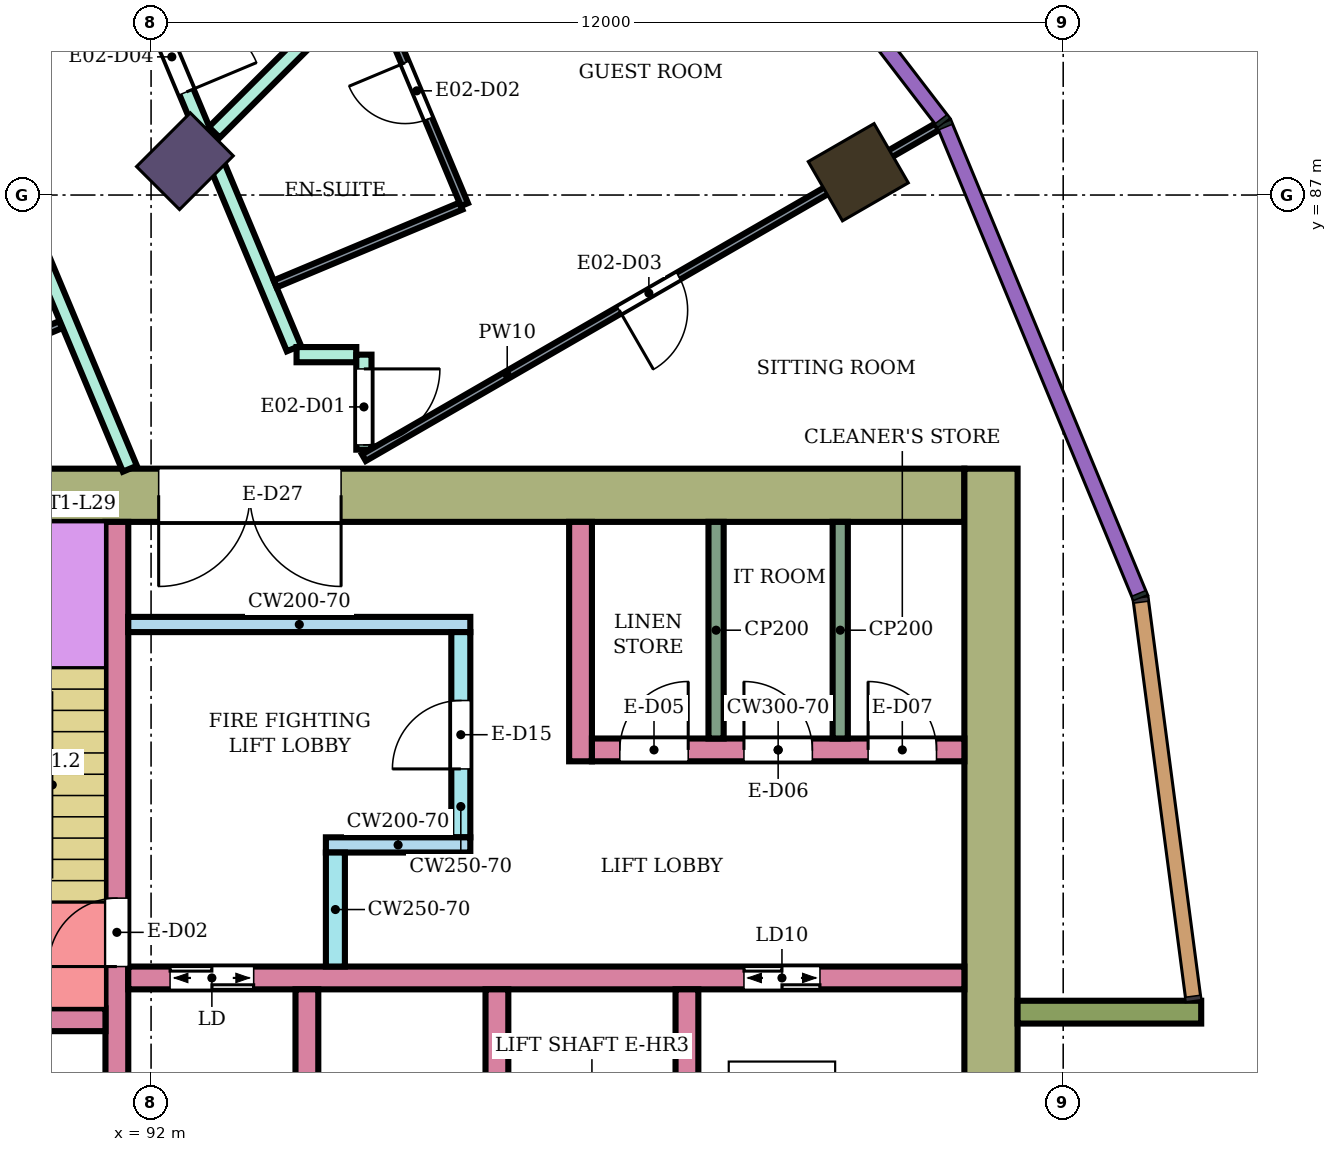
"""IFC4 building model, lengths in metres.
Left out: names, types, materials, properties, quantities, classifications, styles, units other than length and angle.
Written with IfcOpenShell. Run it as: python <this file> out.ifc"""

import sys

from ifc_helpers import new_model, si_unit, direction, frame, frame_2d, origin, origin_2d, place, context, subcontext, project, spatial, rectangle, extrude, element, fill, save


model = new_model("IFC4")
c1 = context("Model", 3, precision=1e-05, world=origin(), true_north=direction((0.0, 1.0)))
c2 = subcontext(c1, "Body", "Model", "MODEL_VIEW")
j1 = project(units=[si_unit("LENGTHUNIT", "METRE"), si_unit("PLANEANGLEUNIT", "RADIAN")], contexts=[c1])
p1 = place(None, origin())
s1 = spatial("IfcSite", under=j1, at=p1, CompositionType="ELEMENT")
p2 = place(p1, origin())
s2 = spatial("IfcBuilding", under=s1, at=p2, CompositionType="ELEMENT")
p3 = place(p2, frame((0.0, 0.0, 126.3)))
s3 = spatial("IfcBuildingStorey", under=s2, at=p3, CompositionType="ELEMENT", Elevation=126.3)
p4 = place(p3, frame((101.304, 87.3, 0.0), z_axis=(0.0, 0.0, 1.0), x_axis=(0.866025403784, 0.5, 0.0)))
e1 = element("IfcColumn", 1, at=p4, inside=s3, PredefinedType="COLUMN", context=c2, shape_type="SweptSolid", body=[
    extrude(rectangle(XDim=1.0, YDim=0.9, at=origin_2d()), origin(), (0.0, 0.0, 1.0), 3.9),
])
p5 = place(p3, frame((92.445, 87.445, 0.0), z_axis=(0.0, 0.0, 1.0), x_axis=(0.707106781187, 0.707106781187, 0.0)))
e2 = element("IfcColumn", 2, at=p5, inside=s3, PredefinedType="COLUMN", context=c2, shape_type="SweptSolid", body=[
    extrude(rectangle(XDim=1.0, YDim=0.8, at=origin_2d()), origin(), (0.0, 0.0, 1.0), 3.9),
])
p6 = place(p3, frame((87.9, 83.05, 0.0), z_axis=(0.0, 0.0, 1.0), x_axis=(1.0, 0.0, 0.0)))
e3 = element("IfcWall", 3, at=p6, inside=s3, PredefinedType="SHEAR", context=c2, shape_type="SweptSolid", body=[
    extrude(rectangle(XDim=14.8, YDim=0.7, at=frame_2d((7.4, 0.0))), origin(), (0.0, 0.0, 1.0), 3.58),
])
p7 = place(p6, frame((4.2, 0.0, 0.0)))
e4 = element("IfcOpeningElement", 4, at=p7, cuts=e3, PredefinedType="OPENING", context=c2, shape_type="SweptSolid", body=[
    extrude(rectangle(XDim=2.4, YDim=2.4, at=frame_2d((1.2, 1.2))), frame((0.0, 0.36, 0.0), z_axis=(0.0, -1.0, 0.0), x_axis=(1.0, 0.0, 0.0)), (0.0, 0.0, 1.0), 0.72),
])
p8 = place(p3, frame((103.05, 66.6, 0.0), z_axis=(0.0, 0.0, 1.0), x_axis=(0.0, 1.0, 0.0)))
e5 = element("IfcWall", 5, at=p8, inside=s3, PredefinedType="SHEAR", context=c2, shape_type="SweptSolid", body=[
    extrude(rectangle(XDim=16.8, YDim=0.7, at=frame_2d((8.4, 0.0))), origin(), (0.0, 0.0, 1.0), 3.58),
])
p9 = place(p3, frame((91.55, 75.0, 0.0), z_axis=(0.0, 0.0, 1.0), x_axis=(0.0, 1.0, 0.0)))
e6 = element("IfcWall", 6, at=p9, inside=s3, PredefinedType="SHEAR", context=c2, shape_type="SweptSolid", body=[
    extrude(rectangle(XDim=7.7, YDim=0.3, at=frame_2d((3.85, 0.0))), origin(), (0.0, 0.0, 1.0), 3.58),
])
p10 = place(p9, frame((1.85, 0.0, 0.0)))
e7 = element("IfcOpeningElement", 7, at=p10, cuts=e6, PredefinedType="OPENING", context=c2, shape_type="SweptSolid", body=[
    extrude(rectangle(XDim=0.9, YDim=2.1, at=frame_2d((0.45, 1.05))), frame((0.0, 0.16, 0.0), z_axis=(0.0, -1.0, 0.0), x_axis=(1.0, 0.0, 0.0)), (0.0, 0.0, 1.0), 0.32),
])
p11 = place(p3, frame((88.35, 76.15, 0.0), z_axis=(0.0, 0.0, 1.0), x_axis=(1.0, 0.0, 0.0)))
e8 = element("IfcWall", 8, at=p11, inside=s3, PredefinedType="SHEAR", context=c2, shape_type="SweptSolid", body=[
    extrude(rectangle(XDim=3.05, YDim=0.3, at=frame_2d((1.525, 0.0))), origin(), (0.0, 0.0, 1.0), 3.58),
])
p12 = place(p11, frame((1.1, 0.0, 0.0)))
e9 = element("IfcOpeningElement", 9, at=p12, cuts=e8, PredefinedType="OPENING", context=c2, shape_type="SweptSolid", body=[
    extrude(rectangle(XDim=0.7, YDim=2.0, at=frame_2d((0.35, 1.0))), frame((0.0, 0.16, 0.0), z_axis=(0.0, -1.0, 0.0), x_axis=(1.0, 0.0, 0.0)), (0.0, 0.0, 1.0), 0.32),
])
p13 = place(p3, frame((91.7, 76.7, 0.0), z_axis=(0.0, 0.0, 1.0), x_axis=(1.0, 0.0, 0.0)))
e10 = element("IfcWall", 10, at=p13, inside=s3, PredefinedType="SHEAR", context=c2, shape_type="SweptSolid", body=[
    extrude(rectangle(XDim=11.0, YDim=0.3, at=frame_2d((5.5, 0.0))), origin(), (0.0, 0.0, 1.0), 3.58),
])
p14 = place(p13, frame((0.55, 0.0, 0.0)))
e11 = element("IfcOpeningElement", 11, at=p14, cuts=e10, PredefinedType="OPENING", context=c2, shape_type="SweptSolid", body=[
    extrude(rectangle(XDim=1.1, YDim=2.1, at=frame_2d((0.55, 1.05))), frame((0.0, 0.16, 0.0), z_axis=(0.0, -1.0, 0.0), x_axis=(1.0, 0.0, 0.0)), (0.0, 0.0, 1.0), 0.32),
])
p15 = place(p13, frame((8.1, 0.0, 0.0)))
e12 = element("IfcOpeningElement", 12, at=p15, cuts=e10, PredefinedType="OPENING", context=c2, shape_type="SweptSolid", body=[
    extrude(rectangle(XDim=1.0, YDim=2.1, at=frame_2d((0.5, 1.05))), frame((0.0, 0.16, 0.0), z_axis=(0.0, -1.0, 0.0), x_axis=(1.0, 0.0, 0.0)), (0.0, 0.0, 1.0), 0.32),
])
for number, where, z_axis, x_axis in (
    (13, (94.05, 74.0, 0.0), (0.0, 0.0, 1.0), (0.0, 1.0, 0.0)),
    (14, (96.55, 74.0, 0.0), (0.0, 0.0, 1.0), (0.0, 1.0, 0.0)),
    (15, (99.05, 74.0, 0.0), (0.0, 0.0, 1.0), (0.0, 1.0, 0.0)),
):
    element("IfcWall", number, at=place(p3, frame(where, z_axis=z_axis, x_axis=x_axis)), inside=s3, PredefinedType="SHEAR", context=c2, shape_type="SweptSolid", body=[
        extrude(rectangle(XDim=2.55, YDim=0.3, at=frame_2d((1.275, 0.0))), origin(), (0.0, 0.0, 1.0), 3.58),
    ])
p16 = place(p3, frame((91.7, 81.35, 0.0), z_axis=(0.0, 0.0, 1.0), x_axis=(1.0, 0.0, 0.0)))
e16 = element("IfcWall", 16, at=p16, inside=s3, PredefinedType="SHEAR", context=c2, shape_type="SweptSolid", body=[
    extrude(rectangle(XDim=4.5, YDim=0.2, at=frame_2d((2.25, 0.0))), origin(), (0.0, 0.0, 1.0), 3.58),
])
p17 = place(p3, frame((96.075, 78.55, 0.0), z_axis=(0.0, 0.0, 1.0), x_axis=(0.0, 1.0, 0.0)))
e17 = element("IfcWall", 17, at=p17, inside=s3, PredefinedType="SHEAR", context=c2, shape_type="SweptSolid", body=[
    extrude(rectangle(XDim=2.7, YDim=0.25, at=frame_2d((1.35, 0.0))), origin(), (0.0, 0.0, 1.0), 3.58),
])
p18 = place(p17, frame((0.9, 0.0, 0.0)))
e18 = element("IfcOpeningElement", 18, at=p18, cuts=e17, PredefinedType="OPENING", context=c2, shape_type="SweptSolid", body=[
    extrude(rectangle(XDim=0.9, YDim=2.1, at=frame_2d((0.45, 1.05))), frame((0.0, 0.135, 0.0), z_axis=(0.0, -1.0, 0.0), x_axis=(1.0, 0.0, 0.0)), (0.0, 0.0, 1.0), 0.27),
])
p19 = place(p3, frame((94.3, 78.45, 0.0), z_axis=(0.0, 0.0, 1.0), x_axis=(1.0, 0.0, 0.0)))
e19 = element("IfcWall", 19, at=p19, inside=s3, PredefinedType="SHEAR", context=c2, shape_type="SweptSolid", body=[
    extrude(rectangle(XDim=1.9, YDim=0.2, at=frame_2d((0.95, 0.0))), origin(), (0.0, 0.0, 1.0), 3.58),
])
p20 = place(p3, frame((94.425, 76.85, 0.0), z_axis=(0.0, 0.0, 1.0), x_axis=(0.0, 1.0, 0.0)))
e20 = element("IfcWall", 20, at=p20, inside=s3, PredefinedType="SHEAR", context=c2, shape_type="SweptSolid", body=[
    extrude(rectangle(XDim=1.5, YDim=0.25, at=frame_2d((0.75, 0.0))), origin(), (0.0, 0.0, 1.0), 3.58),
])
p21 = place(p3, frame((97.65, 79.55, 0.0), z_axis=(0.0, 0.0, 1.0), x_axis=(0.0, 1.0, 0.0)))
e21 = element("IfcWall", 21, at=p21, inside=s3, PredefinedType="SHEAR", context=c2, shape_type="SweptSolid", body=[
    extrude(rectangle(XDim=3.15, YDim=0.3, at=frame_2d((1.575, 0.0))), origin(), (0.0, 0.0, 1.0), 3.58),
])
p22 = place(p3, frame((97.8, 79.7, 0.0), z_axis=(0.0, 0.0, 1.0), x_axis=(1.0, 0.0, 0.0)))
e22 = element("IfcWall", 22, at=p22, inside=s3, PredefinedType="SHEAR", context=c2, shape_type="SweptSolid", body=[
    extrude(rectangle(XDim=4.9, YDim=0.3, at=frame_2d((2.45, 0.0))), origin(), (0.0, 0.0, 1.0), 3.58),
])
p23 = place(p22, frame((0.367, 0.0, 0.0)))
e23 = element("IfcOpeningElement", 23, at=p23, cuts=e22, PredefinedType="OPENING", context=c2, shape_type="SweptSolid", body=[
    extrude(rectangle(XDim=0.9, YDim=2.1, at=frame_2d((0.45, 1.05))), frame((0.0, 0.16, 0.0), z_axis=(0.0, -1.0, 0.0), x_axis=(1.0, 0.0, 0.0)), (0.0, 0.0, 1.0), 0.32),
])
p24 = place(p22, frame((2.0, 0.0, 0.0)))
e24 = element("IfcOpeningElement", 24, at=p24, cuts=e22, PredefinedType="OPENING", context=c2, shape_type="SweptSolid", body=[
    extrude(rectangle(XDim=0.9, YDim=2.1, at=frame_2d((0.45, 1.05))), frame((0.0, 0.16, 0.0), z_axis=(0.0, -1.0, 0.0), x_axis=(1.0, 0.0, 0.0)), (0.0, 0.0, 1.0), 0.32),
])
p25 = place(p22, frame((3.633, 0.0, 0.0)))
e25 = element("IfcOpeningElement", 25, at=p25, cuts=e22, PredefinedType="OPENING", context=c2, shape_type="SweptSolid", body=[
    extrude(rectangle(XDim=0.9, YDim=2.1, at=frame_2d((0.45, 1.05))), frame((0.0, 0.16, 0.0), z_axis=(0.0, -1.0, 0.0), x_axis=(1.0, 0.0, 0.0)), (0.0, 0.0, 1.0), 0.32),
])
p26 = place(p3, frame((103.4, 76.25, 0.0), z_axis=(0.0, 0.0, 1.0), x_axis=(1.0, 0.0, 0.0)))
e26 = element("IfcWall", 26, at=p26, inside=s3, PredefinedType="NOTDEFINED", context=c2, shape_type="SweptSolid", body=[
    extrude(rectangle(XDim=2.416, YDim=0.3, at=frame_2d((1.208, 0.0))), origin(), (0.0, 0.0, 1.0), 3.9),
])
p27 = place(p3, frame((88.698, 90.624, 0.0), z_axis=(0.0, 0.0, 1.0), x_axis=(0.386027055918, -0.922487459047, 0.0)))
e27 = element("IfcWall", 27, at=p27, inside=s3, PredefinedType="PARTITIONING", context=c2, shape_type="SweptSolid", body=[
    extrude(rectangle(XDim=7.832, YDim=0.2, at=frame_2d((3.916, 0.0))), origin(), (0.0, 0.0, 1.0), 3.45),
])
p28 = place(p27, frame((1.482, 0.0, 0.0)))
e28 = element("IfcOpeningElement", 28, at=p28, cuts=e27, PredefinedType="OPENING", context=c2, shape_type="SweptSolid", body=[
    extrude(rectangle(XDim=1.0, YDim=2.1, at=frame_2d((0.5, 1.05))), frame((0.0, 0.11, 0.0), z_axis=(0.0, -1.0, 0.0), x_axis=(1.0, 0.0, 0.0)), (0.0, 0.0, 1.0), 0.22),
])
p29 = place(p3, frame((90.604, 92.805, 0.0), z_axis=(0.0, 0.0, 1.0), x_axis=(0.386199042801, -0.922415470024, 0.0)))
e29 = element("IfcWall", 29, at=p29, inside=s3, PredefinedType="PARTITIONING", context=c2, shape_type="SweptSolid", body=[
    extrude(rectangle(XDim=8.48, YDim=0.2, at=frame_2d((4.24, 0.0))), origin(), (0.0, 0.0, 1.0), 3.45),
])
p30 = place(p29, frame((3.823, 0.0, 0.0)))
e30 = element("IfcOpeningElement", 30, at=p30, cuts=e29, PredefinedType="OPENING", context=c2, shape_type="SweptSolid", body=[
    extrude(rectangle(XDim=1.0, YDim=2.1, at=frame_2d((0.5, 1.05))), frame((0.0, 0.11, 0.0), z_axis=(0.0, -1.0, 0.0), x_axis=(1.0, 0.0, 0.0)), (0.0, 0.0, 1.0), 0.22),
])
p31 = place(p3, frame((92.832, 87.825, 0.0), z_axis=(0.0, 0.0, 1.0), x_axis=(0.707275688599, 0.706937833418, 0.0)))
e31 = element("IfcWall", 31, at=p31, inside=s3, PredefinedType="PARTITIONING", context=c2, shape_type="SweptSolid", body=[
    extrude(rectangle(XDim=5.058, YDim=0.2, at=frame_2d((2.529, 0.0))), origin(), (0.0, 0.0, 1.0), 3.45),
])
p32 = place(p3, frame((93.914, 84.9, 0.0), z_axis=(0.0, 0.0, 1.0), x_axis=(1.0, 0.0, 0.0)))
e32 = element("IfcWall", 32, at=p32, inside=s3, PredefinedType="PARTITIONING", context=c2, shape_type="SweptSolid", body=[
    extrude(rectangle(XDim=0.786, YDim=0.2, at=frame_2d((0.393, 0.0))), origin(), (0.0, 0.0, 1.0), 3.45),
])
p33 = place(p3, frame((94.8, 83.65, 0.0), z_axis=(0.0, 0.0, 1.0), x_axis=(0.0, 1.0, 0.0)))
e33 = element("IfcWall", 33, at=p33, inside=s3, PredefinedType="PARTITIONING", context=c2, shape_type="SweptSolid", body=[
    extrude(rectangle(XDim=1.25, YDim=0.2, at=frame_2d((0.625, 0.0))), origin(), (0.0, 0.0, 1.0), 3.45),
])
p34 = place(p33, frame((0.062, 0.0, 0.0)))
e34 = element("IfcOpeningElement", 34, at=p34, cuts=e33, PredefinedType="OPENING", context=c2, shape_type="SweptSolid", body=[
    extrude(rectangle(XDim=1.0, YDim=2.1, at=frame_2d((0.5, 1.05))), frame((0.0, 0.11, 0.0), z_axis=(0.0, -1.0, 0.0), x_axis=(1.0, 0.0, 0.0)), (0.0, 0.0, 1.0), 0.22),
])
p35 = place(p3, frame((88.329, 84.255, 0.0), z_axis=(0.0, 0.0, 1.0), x_axis=(0.922320663728, 0.386425404522, 0.0)))
e35 = element("IfcWall", 35, at=p35, inside=s3, PredefinedType="PARTITIONING", context=c2, shape_type="SweptSolid", body=[
    extrude(rectangle(XDim=2.69, YDim=0.1, at=frame_2d((1.345, 0.0))), origin(), (0.0, 0.0, 1.0), 3.45),
])
p36 = place(p35, frame((1.0, 0.0, 0.0)))
e36 = element("IfcOpeningElement", 36, at=p36, cuts=e35, PredefinedType="OPENING", context=c2, shape_type="SweptSolid", body=[
    extrude(rectangle(XDim=0.8, YDim=2.1, at=frame_2d((0.4, 1.05))), frame((0.0, 0.06, 0.0), z_axis=(0.0, -1.0, 0.0), x_axis=(1.0, 0.0, 0.0)), (0.0, 0.0, 1.0), 0.12),
])
p37 = place(p3, frame((93.633, 85.831, 0.0), z_axis=(0.0, 0.0, 1.0), x_axis=(0.922344808264, 0.38636777126, 0.0)))
e37 = element("IfcWall", 37, at=p37, inside=s3, PredefinedType="PARTITIONING", context=c2, shape_type="SweptSolid", body=[
    extrude(rectangle(XDim=2.65, YDim=0.1, at=frame_2d((1.325, 0.0))), origin(), (0.0, 0.0, 1.0), 3.45),
])
p38 = place(p3, frame((94.8, 83.545, 0.0), z_axis=(0.0, 0.0, 1.0), x_axis=(0.86602264145, 0.500004784474, 0.0)))
e38 = element("IfcWall", 38, at=p38, inside=s3, PredefinedType="PARTITIONING", context=c2, shape_type="SweptSolid", body=[
    extrude(rectangle(XDim=8.708, YDim=0.1, at=frame_2d((4.354, 0.0))), origin(), (0.0, 0.0, 1.0), 3.45),
])
p39 = place(p38, frame((3.879, 0.0, 0.0)))
e39 = element("IfcOpeningElement", 39, at=p39, cuts=e38, PredefinedType="OPENING", context=c2, shape_type="SweptSolid", body=[
    extrude(rectangle(XDim=0.9, YDim=2.1, at=frame_2d((0.45, 1.05))), frame((0.0, 0.06, 0.0), z_axis=(0.0, -1.0, 0.0), x_axis=(1.0, 0.0, 0.0)), (0.0, 0.0, 1.0), 0.12),
])
p40 = place(p3, frame((94.919, 89.748, 0.0), z_axis=(0.0, 0.0, 1.0), x_axis=(0.386255913529, -0.922391657196, 0.0)))
e40 = element("IfcWall", 40, at=p40, inside=s3, PredefinedType="PARTITIONING", context=c2, shape_type="SweptSolid", body=[
    extrude(rectangle(XDim=3.116, YDim=0.1, at=frame_2d((1.558, 0.0))), origin(), (0.0, 0.0, 1.0), 3.45),
])
p41 = place(p40, frame((1.093, 0.0, 0.0)))
e41 = element("IfcOpeningElement", 41, at=p41, cuts=e40, PredefinedType="OPENING", context=c2, shape_type="SweptSolid", body=[
    extrude(rectangle(XDim=0.8, YDim=2.1, at=frame_2d((0.4, 1.05))), frame((0.0, 0.06, 0.0), z_axis=(0.0, -1.0, 0.0), x_axis=(1.0, 0.0, 0.0)), (0.0, 0.0, 1.0), 0.12),
])
for number, where, z_axis, x_axis in (
    (42, (99.433, 79.85, 0.0), (0.0, 0.0, 1.0), (0.0, 1.0, 0.0)),
    (43, (101.067, 79.85, 0.0), (0.0, 0.0, 1.0), (0.0, 1.0, 0.0)),
):
    element("IfcWall", number, at=place(p3, frame(where, z_axis=z_axis, x_axis=x_axis)), inside=s3, PredefinedType="PARTITIONING", context=c2, shape_type="SweptSolid", body=[
        extrude(rectangle(XDim=2.85, YDim=0.2, at=frame_2d((1.425, 0.0))), origin(), (0.0, 0.0, 1.0), 3.58),
    ])
p42 = place(p34, frame((1.0, 0.0, 0.0), z_axis=(0.0, 0.0, 1.0), x_axis=(-1.0, 0.0, 0.0)))
e44 = element("IfcDoor", 44, at=p42, inside=s3, OperationType="SINGLE_SWING_LEFT", PredefinedType="DOOR", context=c2, shape_type="SweptSolid", body=[
    extrude(rectangle(XDim=1.0, YDim=2.1, at=frame_2d((0.5, 1.05))), frame((0.0, 0.025, 0.0), z_axis=(0.0, -1.0, 0.0), x_axis=(1.0, 0.0, 0.0)), (0.0, 0.0, 1.0), 0.05),
])
fill(e34, e44)
p43 = place(p41, frame((0.8, 0.0, 0.0), z_axis=(0.0, 0.0, 1.0), x_axis=(-1.0, 0.0, 0.0)))
e45 = element("IfcDoor", 45, at=p43, inside=s3, OperationType="SINGLE_SWING_RIGHT", PredefinedType="DOOR", context=c2, shape_type="SweptSolid", body=[
    extrude(rectangle(XDim=0.8, YDim=2.1, at=frame_2d((0.4, 1.05))), frame((0.0, 0.025, 0.0), z_axis=(0.0, -1.0, 0.0), x_axis=(1.0, 0.0, 0.0)), (0.0, 0.0, 1.0), 0.05),
])
fill(e41, e45)
p44 = place(p39, frame((0.9, 0.0, 0.0), z_axis=(0.0, 0.0, 1.0), x_axis=(-1.0, 0.0, 0.0)))
e46 = element("IfcDoor", 46, at=p44, inside=s3, OperationType="SINGLE_SWING_RIGHT", PredefinedType="DOOR", context=c2, shape_type="SweptSolid", body=[
    extrude(rectangle(XDim=0.9, YDim=2.1, at=frame_2d((0.45, 1.05))), frame((0.0, 0.025, 0.0), z_axis=(0.0, -1.0, 0.0), x_axis=(1.0, 0.0, 0.0)), (0.0, 0.0, 1.0), 0.05),
])
fill(e39, e46)
p45 = place(p30, origin())
e47 = element("IfcDoor", 47, at=p45, inside=s3, OperationType="SINGLE_SWING_RIGHT", PredefinedType="DOOR", context=c2, shape_type="SweptSolid", body=[
    extrude(rectangle(XDim=1.0, YDim=2.1, at=frame_2d((0.5, 1.05))), frame((0.0, 0.025, 0.0), z_axis=(0.0, -1.0, 0.0), x_axis=(1.0, 0.0, 0.0)), (0.0, 0.0, 1.0), 0.05),
])
fill(e30, e47)
p46 = place(p10, origin())
e48 = element("IfcDoor", 48, at=p46, inside=s3, OperationType="SINGLE_SWING_LEFT", PredefinedType="DOOR", context=c2, shape_type="SweptSolid", body=[
    extrude(rectangle(XDim=0.9, YDim=2.1, at=frame_2d((0.45, 1.05))), frame((0.0, 0.025, 0.0), z_axis=(0.0, -1.0, 0.0), x_axis=(1.0, 0.0, 0.0)), (0.0, 0.0, 1.0), 0.05),
])
fill(e7, e48)
p47 = place(p14, origin())
e49 = element("IfcDoor", 49, at=p47, inside=s3, OperationType="DOUBLE_DOOR_SLIDING", PredefinedType="DOOR", context=c2, shape_type="SweptSolid", body=[
    extrude(rectangle(XDim=1.1, YDim=2.1, at=frame_2d((0.55, 1.05))), frame((0.0, 0.025, 0.0), z_axis=(0.0, -1.0, 0.0), x_axis=(1.0, 0.0, 0.0)), (0.0, 0.0, 1.0), 0.05),
])
fill(e11, e49)
p48 = place(p15, origin())
e50 = element("IfcDoor", 50, at=p48, inside=s3, OperationType="DOUBLE_DOOR_SLIDING", PredefinedType="DOOR", context=c2, shape_type="SweptSolid", body=[
    extrude(rectangle(XDim=1.0, YDim=2.1, at=frame_2d((0.5, 1.05))), frame((0.0, 0.025, 0.0), z_axis=(0.0, -1.0, 0.0), x_axis=(1.0, 0.0, 0.0)), (0.0, 0.0, 1.0), 0.05),
])
fill(e12, e50)
p49 = place(p18, origin())
e51 = element("IfcDoor", 51, at=p49, inside=s3, OperationType="SINGLE_SWING_LEFT", PredefinedType="DOOR", context=c2, shape_type="SweptSolid", body=[
    extrude(rectangle(XDim=0.9, YDim=2.1, at=frame_2d((0.45, 1.05))), frame((0.0, 0.025, 0.0), z_axis=(0.0, -1.0, 0.0), x_axis=(1.0, 0.0, 0.0)), (0.0, 0.0, 1.0), 0.05),
])
fill(e18, e51)
p50 = place(p23, origin())
e52 = element("IfcDoor", 52, at=p50, inside=s3, OperationType="SINGLE_SWING_RIGHT", PredefinedType="DOOR", context=c2, shape_type="SweptSolid", body=[
    extrude(rectangle(XDim=0.9, YDim=2.1, at=frame_2d((0.45, 1.05))), frame((0.0, 0.025, 0.0), z_axis=(0.0, -1.0, 0.0), x_axis=(1.0, 0.0, 0.0)), (0.0, 0.0, 1.0), 0.05),
])
fill(e23, e52)
p51 = place(p24, origin())
e53 = element("IfcDoor", 53, at=p51, inside=s3, OperationType="SINGLE_SWING_LEFT", PredefinedType="DOOR", context=c2, shape_type="SweptSolid", body=[
    extrude(rectangle(XDim=0.9, YDim=2.1, at=frame_2d((0.45, 1.05))), frame((0.0, 0.025, 0.0), z_axis=(0.0, -1.0, 0.0), x_axis=(1.0, 0.0, 0.0)), (0.0, 0.0, 1.0), 0.05),
])
fill(e24, e53)
p52 = place(p25, origin())
e54 = element("IfcDoor", 54, at=p52, inside=s3, OperationType="SINGLE_SWING_LEFT", PredefinedType="DOOR", context=c2, shape_type="SweptSolid", body=[
    extrude(rectangle(XDim=0.9, YDim=2.1, at=frame_2d((0.45, 1.05))), frame((0.0, 0.025, 0.0), z_axis=(0.0, -1.0, 0.0), x_axis=(1.0, 0.0, 0.0)), (0.0, 0.0, 1.0), 0.05),
])
fill(e25, e54)
p53 = place(p7, frame((2.4, 0.0, 0.0), z_axis=(0.0, 0.0, 1.0), x_axis=(-1.0, 0.0, 0.0)))
e55 = element("IfcDoor", 55, at=p53, inside=s3, OperationType="DOUBLE_DOOR_SINGLE_SWING", PredefinedType="DOOR", context=c2, shape_type="SweptSolid", body=[
    extrude(rectangle(XDim=2.4, YDim=2.4, at=frame_2d((1.2, 1.2))), frame((0.0, 0.025, 0.0), z_axis=(0.0, -1.0, 0.0), x_axis=(1.0, 0.0, 0.0)), (0.0, 0.0, 1.0), 0.05),
])
fill(e4, e55)
save(model, sys.argv[1])
